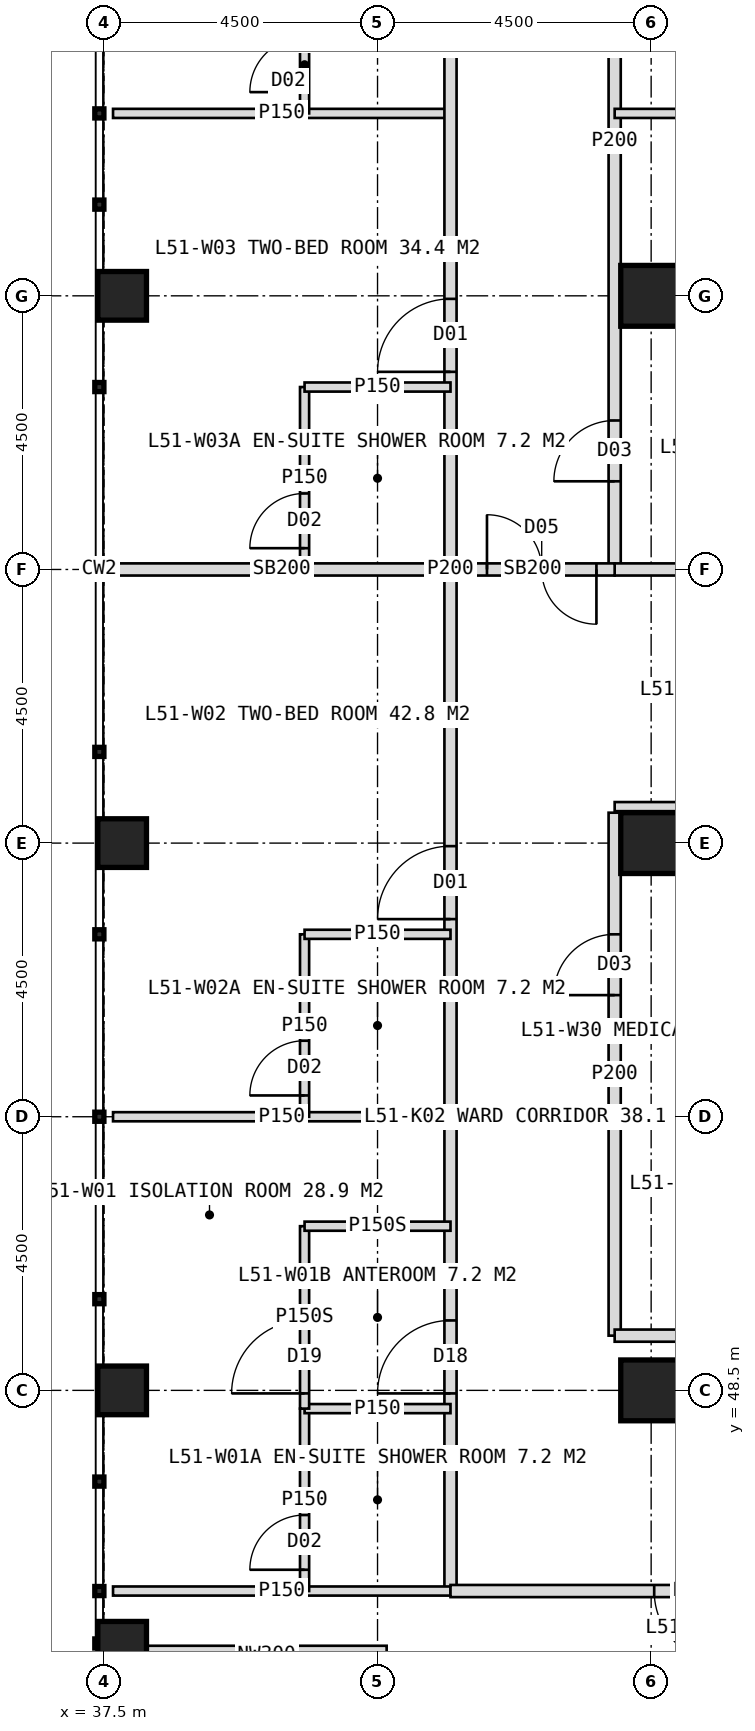
"""IFC4 building model, lengths in metres.
Left out: names, types, materials, properties, quantities, classifications, styles, units other than length and angle.
Written with IfcOpenShell. Run it as: python <this file> out.ifc"""

import sys

from ifc_helpers import new_model, si_unit, direction, frame, frame_2d, origin, origin_2d, place, context, subcontext, project, spatial, rectangle, hollow_rectangle, extrude, element, fill, save


model = new_model("IFC4")
c1 = context("Model", 3, precision=1e-05, world=origin(), true_north=direction((0.0, 1.0)))
c2 = subcontext(c1, "Body", "Model", "MODEL_VIEW")
j1 = project(units=[si_unit("LENGTHUNIT", "METRE"), si_unit("PLANEANGLEUNIT", "RADIAN")], contexts=[c1])
p1 = place(None, origin())
s1 = spatial("IfcSite", under=j1, at=p1, CompositionType="ELEMENT")
p2 = place(p1, origin())
s2 = spatial("IfcBuilding", under=s1, at=p2, CompositionType="ELEMENT")
p3 = place(p2, frame((0.0, 0.0, 213.0)))
s3 = spatial("IfcBuildingStorey", under=s2, at=p3, CompositionType="ELEMENT", Elevation=213.0)
for number, where, z_axis, x_axis in (
    (1, (46.5, 48.5, 0.0), (0.0, 0.0, 1.0), (1.0, 0.0, 0.0)),
    (2, (46.5, 57.5, 0.0), (0.0, 0.0, 1.0), (1.0, 0.0, 0.0)),
    (3, (46.5, 66.5, 0.0), (0.0, 0.0, 1.0), (1.0, 0.0, 0.0)),
):
    element("IfcColumn", number, at=place(p3, frame(where, z_axis=z_axis, x_axis=x_axis)), inside=s3, PredefinedType="COLUMN", context=c2, shape_type="SweptSolid", body=[
        extrude(hollow_rectangle(XDim=1.0, YDim=1.0, WallThickness=0.1, at=origin_2d()), origin(), (0.0, 0.0, 1.0), 4.0),
    ])
for number, where, z_axis, x_axis in (
    (4, (37.8, 44.3, 0.0), (0.0, 0.0, 1.0), (1.0, 0.0, 0.0)),
    (5, (37.8, 48.5, 0.0), (0.0, 0.0, 1.0), (1.0, 0.0, 0.0)),
    (6, (37.8, 57.5, 0.0), (0.0, 0.0, 1.0), (1.0, 0.0, 0.0)),
    (7, (37.8, 66.5, 0.0), (0.0, 0.0, 1.0), (1.0, 0.0, 0.0)),
):
    element("IfcColumn", number, at=place(p3, frame(where, z_axis=z_axis, x_axis=x_axis)), inside=s3, PredefinedType="COLUMN", context=c2, shape_type="SweptSolid", body=[
        extrude(hollow_rectangle(XDim=0.8, YDim=0.8, WallThickness=0.08, at=origin_2d()), origin(), (0.0, 0.0, 1.0), 4.0),
    ])
p4 = place(p3, frame((42.15, 44.15, 0.0), z_axis=(0.0, 0.0, 1.0), x_axis=(-1.0, 0.0, 0.0)))
e8 = element("IfcWall", 8, at=p4, inside=s3, PredefinedType="ELEMENTEDWALL", context=c2, shape_type="SweptSolid", body=[
    extrude(rectangle(XDim=3.95, YDim=0.3, at=frame_2d((1.975, 0.0))), origin(), (0.0, 0.0, 1.0), 2.85),
])
p5 = place(p3, frame((43.2, 53.0, 0.0), z_axis=(0.0, 0.0, 1.0), x_axis=(-1.0, 0.0, 0.0)))
e9 = element("IfcWall", 9, at=p5, inside=s3, PredefinedType="PARTITIONING", context=c2, shape_type="SweptSolid", body=[
    extrude(rectangle(XDim=5.55, YDim=0.15, at=frame_2d((2.775, 0.0))), origin(), (0.0, 0.0, 1.0), 3.75),
])
p6 = place(p3, frame((43.2, 62.0, 0.0), z_axis=(0.0, 0.0, 1.0), x_axis=(-1.0, 0.0, 0.0)))
e10 = element("IfcWall", 10, at=p6, inside=s3, PredefinedType="SOLIDWALL", context=c2, shape_type="SweptSolid", body=[
    extrude(rectangle(XDim=5.55, YDim=0.2, at=frame_2d((2.775, 0.0))), origin(), (0.0, 0.0, 1.0), 2.95),
])
p7 = place(p3, frame((43.2, 69.5, 0.0), z_axis=(0.0, 0.0, 1.0), x_axis=(-1.0, 0.0, 0.0)))
e11 = element("IfcWall", 11, at=p7, inside=s3, PredefinedType="PARTITIONING", context=c2, shape_type="SweptSolid", body=[
    extrude(rectangle(XDim=5.55, YDim=0.15, at=frame_2d((2.775, 0.0))), origin(), (0.0, 0.0, 1.0), 3.75),
])
p8 = place(p3, frame((43.2, 45.2, 0.0), z_axis=(0.0, 0.0, 1.0), x_axis=(0.0, 1.0, 0.0)))
e12 = element("IfcWall", 12, at=p8, inside=s3, PredefinedType="PARTITIONING", context=c2, shape_type="SweptSolid", body=[
    extrude(rectangle(XDim=33.6, YDim=0.2, at=frame_2d((16.8, 0.0))), origin(), (0.0, 0.0, 1.0), 3.75),
])
p9 = place(p8, frame((3.25, 0.0, 0.0)))
e13 = element("IfcOpeningElement", 13, at=p9, cuts=e12, PredefinedType="OPENING", context=c2, shape_type="SweptSolid", body=[
    extrude(rectangle(XDim=1.2, YDim=2.2, at=frame_2d((0.6, 1.1))), frame((0.0, 0.11, 0.0), z_axis=(0.0, -1.0, 0.0), x_axis=(1.0, 0.0, 0.0)), (0.0, 0.0, 1.0), 0.22),
])
p10 = place(p8, frame((11.05, 0.0, 0.0)))
e14 = element("IfcOpeningElement", 14, at=p10, cuts=e12, PredefinedType="OPENING", context=c2, shape_type="SweptSolid", body=[
    extrude(rectangle(XDim=1.2, YDim=2.2, at=frame_2d((0.6, 1.1))), frame((0.0, 0.11, 0.0), z_axis=(0.0, -1.0, 0.0), x_axis=(1.0, 0.0, 0.0)), (0.0, 0.0, 1.0), 0.22),
])
p11 = place(p8, frame((20.05, 0.0, 0.0)))
e15 = element("IfcOpeningElement", 15, at=p11, cuts=e12, PredefinedType="OPENING", context=c2, shape_type="SweptSolid", body=[
    extrude(rectangle(XDim=1.2, YDim=2.2, at=frame_2d((0.6, 1.1))), frame((0.0, 0.11, 0.0), z_axis=(0.0, -1.0, 0.0), x_axis=(1.0, 0.0, 0.0)), (0.0, 0.0, 1.0), 0.22),
])
p12 = place(p8, frame((26.95, 0.0, 0.0)))
e16 = element("IfcOpeningElement", 16, at=p12, cuts=e12, PredefinedType="OPENING", context=c2, shape_type="SweptSolid", body=[
    extrude(rectangle(XDim=1.2, YDim=2.2, at=frame_2d((0.6, 1.1))), frame((0.0, 0.11, 0.0), z_axis=(0.0, -1.0, 0.0), x_axis=(1.0, 0.0, 0.0)), (0.0, 0.0, 1.0), 0.22),
])
p13 = place(p3, frame((43.2, 45.2, 0.0), z_axis=(0.0, 0.0, 1.0), x_axis=(-1.0, 0.0, 0.0)))
e17 = element("IfcWall", 17, at=p13, inside=s3, PredefinedType="PARTITIONING", context=c2, shape_type="SweptSolid", body=[
    extrude(rectangle(XDim=5.55, YDim=0.15, at=frame_2d((2.775, 0.0))), origin(), (0.0, 0.0, 1.0), 3.75),
])
p14 = place(p3, frame((40.8, 45.2, 0.0), z_axis=(0.0, 0.0, 1.0), x_axis=(0.0, 1.0, 0.0)))
e18 = element("IfcWall", 18, at=p14, inside=s3, PredefinedType="PARTITIONING", context=c2, shape_type="SweptSolid", body=[
    extrude(rectangle(XDim=3.0, YDim=0.15, at=frame_2d((1.5, 0.0))), origin(), (0.0, 0.0, 1.0), 3.75),
])
p15 = place(p14, frame((0.35, 0.0, 0.0)))
e19 = element("IfcOpeningElement", 19, at=p15, cuts=e18, PredefinedType="OPENING", context=c2, shape_type="SweptSolid", body=[
    extrude(rectangle(XDim=0.9, YDim=2.1, at=frame_2d((0.45, 1.05))), frame((0.0, 0.085, 0.0), z_axis=(0.0, -1.0, 0.0), x_axis=(1.0, 0.0, 0.0)), (0.0, 0.0, 1.0), 0.17),
])
p16 = place(p3, frame((43.2, 48.2, 0.0), z_axis=(0.0, 0.0, 1.0), x_axis=(-1.0, 0.0, 0.0)))
e20 = element("IfcWall", 20, at=p16, inside=s3, PredefinedType="PARTITIONING", context=c2, shape_type="SweptSolid", body=[
    extrude(rectangle(XDim=2.4, YDim=0.15, at=frame_2d((1.2, 0.0))), origin(), (0.0, 0.0, 1.0), 3.75),
])
p17 = place(p3, frame((40.8, 48.2, 0.0), z_axis=(0.0, 0.0, 1.0), x_axis=(0.0, 1.0, 0.0)))
e21 = element("IfcWall", 21, at=p17, inside=s3, PredefinedType="PARTITIONING", context=c2, shape_type="SweptSolid", body=[
    extrude(rectangle(XDim=3.0, YDim=0.15, at=frame_2d((1.5, 0.0))), origin(), (0.0, 0.0, 1.0), 3.75),
])
p18 = place(p17, frame((0.25, 0.0, 0.0)))
e22 = element("IfcOpeningElement", 22, at=p18, cuts=e21, PredefinedType="OPENING", context=c2, shape_type="SweptSolid", body=[
    extrude(rectangle(XDim=1.2, YDim=2.2, at=frame_2d((0.6, 1.1))), frame((0.0, 0.085, 0.0), z_axis=(0.0, -1.0, 0.0), x_axis=(1.0, 0.0, 0.0)), (0.0, 0.0, 1.0), 0.17),
])
p19 = place(p3, frame((43.2, 51.2, 0.0), z_axis=(0.0, 0.0, 1.0), x_axis=(-1.0, 0.0, 0.0)))
e23 = element("IfcWall", 23, at=p19, inside=s3, PredefinedType="PARTITIONING", context=c2, shape_type="SweptSolid", body=[
    extrude(rectangle(XDim=2.4, YDim=0.15, at=frame_2d((1.2, 0.0))), origin(), (0.0, 0.0, 1.0), 3.75),
])
p20 = place(p3, frame((40.8, 53.0, 0.0), z_axis=(0.0, 0.0, 1.0), x_axis=(0.0, 1.0, 0.0)))
e24 = element("IfcWall", 24, at=p20, inside=s3, PredefinedType="PARTITIONING", context=c2, shape_type="SweptSolid", body=[
    extrude(rectangle(XDim=3.0, YDim=0.15, at=frame_2d((1.5, 0.0))), origin(), (0.0, 0.0, 1.0), 3.75),
])
p21 = place(p20, frame((0.35, 0.0, 0.0)))
e25 = element("IfcOpeningElement", 25, at=p21, cuts=e24, PredefinedType="OPENING", context=c2, shape_type="SweptSolid", body=[
    extrude(rectangle(XDim=0.9, YDim=2.1, at=frame_2d((0.45, 1.05))), frame((0.0, 0.085, 0.0), z_axis=(0.0, -1.0, 0.0), x_axis=(1.0, 0.0, 0.0)), (0.0, 0.0, 1.0), 0.17),
])
p22 = place(p3, frame((43.2, 56.0, 0.0), z_axis=(0.0, 0.0, 1.0), x_axis=(-1.0, 0.0, 0.0)))
e26 = element("IfcWall", 26, at=p22, inside=s3, PredefinedType="PARTITIONING", context=c2, shape_type="SweptSolid", body=[
    extrude(rectangle(XDim=2.4, YDim=0.15, at=frame_2d((1.2, 0.0))), origin(), (0.0, 0.0, 1.0), 3.75),
])
p23 = place(p3, frame((40.8, 62.0, 0.0), z_axis=(0.0, 0.0, 1.0), x_axis=(0.0, 1.0, 0.0)))
e27 = element("IfcWall", 27, at=p23, inside=s3, PredefinedType="PARTITIONING", context=c2, shape_type="SweptSolid", body=[
    extrude(rectangle(XDim=3.0, YDim=0.15, at=frame_2d((1.5, 0.0))), origin(), (0.0, 0.0, 1.0), 3.75),
])
p24 = place(p23, frame((0.35, 0.0, 0.0)))
e28 = element("IfcOpeningElement", 28, at=p24, cuts=e27, PredefinedType="OPENING", context=c2, shape_type="SweptSolid", body=[
    extrude(rectangle(XDim=0.9, YDim=2.1, at=frame_2d((0.45, 1.05))), frame((0.0, 0.085, 0.0), z_axis=(0.0, -1.0, 0.0), x_axis=(1.0, 0.0, 0.0)), (0.0, 0.0, 1.0), 0.17),
])
p25 = place(p3, frame((43.2, 65.0, 0.0), z_axis=(0.0, 0.0, 1.0), x_axis=(-1.0, 0.0, 0.0)))
e29 = element("IfcWall", 29, at=p25, inside=s3, PredefinedType="PARTITIONING", context=c2, shape_type="SweptSolid", body=[
    extrude(rectangle(XDim=2.4, YDim=0.15, at=frame_2d((1.2, 0.0))), origin(), (0.0, 0.0, 1.0), 3.75),
])
p26 = place(p3, frame((40.8, 69.5, 0.0), z_axis=(0.0, 0.0, 1.0), x_axis=(0.0, 1.0, 0.0)))
e30 = element("IfcWall", 30, at=p26, inside=s3, PredefinedType="PARTITIONING", context=c2, shape_type="SweptSolid", body=[
    extrude(rectangle(XDim=2.4, YDim=0.15, at=frame_2d((1.2, 0.0))), origin(), (0.0, 0.0, 1.0), 3.75),
])
p27 = place(p26, frame((0.35, 0.0, 0.0)))
e31 = element("IfcOpeningElement", 31, at=p27, cuts=e30, PredefinedType="OPENING", context=c2, shape_type="SweptSolid", body=[
    extrude(rectangle(XDim=0.9, YDim=2.1, at=frame_2d((0.45, 1.05))), frame((0.0, 0.085, 0.0), z_axis=(0.0, -1.0, 0.0), x_axis=(1.0, 0.0, 0.0)), (0.0, 0.0, 1.0), 0.17),
])
p28 = place(p3, frame((51.0, 53.0, 0.0), z_axis=(0.0, 0.0, 1.0), x_axis=(-1.0, 0.0, 0.0)))
e32 = element("IfcWall", 32, at=p28, inside=s3, PredefinedType="PARTITIONING", context=c2, shape_type="SweptSolid", body=[
    extrude(rectangle(XDim=5.1, YDim=0.15, at=frame_2d((2.55, 0.0))), origin(), (0.0, 0.0, 1.0), 3.75),
])
p29 = place(p3, frame((45.9, 49.4, 0.0), z_axis=(0.0, 0.0, 1.0), x_axis=(0.0, 1.0, 0.0)))
e33 = element("IfcWall", 33, at=p29, inside=s3, PredefinedType="PARTITIONING", context=c2, shape_type="SweptSolid", body=[
    extrude(rectangle(XDim=8.6, YDim=0.2, at=frame_2d((4.3, 0.0))), origin(), (0.0, 0.0, 1.0), 3.75),
])
p30 = place(p29, frame((5.6, 0.0, 0.0)))
e34 = element("IfcOpeningElement", 34, at=p30, cuts=e33, PredefinedType="OPENING", context=c2, shape_type="SweptSolid", body=[
    extrude(rectangle(XDim=1.0, YDim=2.1, at=frame_2d((0.5, 1.05))), frame((0.0, 0.11, 0.0), z_axis=(0.0, -1.0, 0.0), x_axis=(1.0, 0.0, 0.0)), (0.0, 0.0, 1.0), 0.22),
])
p31 = place(p3, frame((45.9, 62.0, 0.0), z_axis=(0.0, 0.0, 1.0), x_axis=(0.0, 1.0, 0.0)))
e35 = element("IfcWall", 35, at=p31, inside=s3, PredefinedType="PARTITIONING", context=c2, shape_type="SweptSolid", body=[
    extrude(rectangle(XDim=14.1, YDim=0.2, at=frame_2d((7.05, 0.0))), origin(), (0.0, 0.0, 1.0), 3.75),
])
p32 = place(p31, frame((1.45, 0.0, 0.0)))
e36 = element("IfcOpeningElement", 36, at=p32, cuts=e35, PredefinedType="OPENING", context=c2, shape_type="SweptSolid", body=[
    extrude(rectangle(XDim=1.0, YDim=2.1, at=frame_2d((0.5, 1.05))), frame((0.0, 0.11, 0.0), z_axis=(0.0, -1.0, 0.0), x_axis=(1.0, 0.0, 0.0)), (0.0, 0.0, 1.0), 0.22),
])
p33 = place(p31, frame((10.3, 0.0, 0.0)))
e37 = element("IfcOpeningElement", 37, at=p33, cuts=e35, PredefinedType="OPENING", context=c2, shape_type="SweptSolid", body=[
    extrude(rectangle(XDim=1.0, YDim=2.1, at=frame_2d((0.5, 1.05))), frame((0.0, 0.11, 0.0), z_axis=(0.0, -1.0, 0.0), x_axis=(1.0, 0.0, 0.0)), (0.0, 0.0, 1.0), 0.22),
])
p34 = place(p3, frame((51.0, 58.1, 0.0), z_axis=(0.0, 0.0, 1.0), x_axis=(-1.0, 0.0, 0.0)))
e38 = element("IfcWall", 38, at=p34, inside=s3, PredefinedType="PARTITIONING", context=c2, shape_type="SweptSolid", body=[
    extrude(rectangle(XDim=5.1, YDim=0.15, at=frame_2d((2.55, 0.0))), origin(), (0.0, 0.0, 1.0), 3.75),
])
p35 = place(p34, frame((0.6, 0.0, 0.0)))
e39 = element("IfcOpeningElement", 39, at=p35, cuts=e38, PredefinedType="OPENING", context=c2, shape_type="SweptSolid", body=[
    extrude(rectangle(XDim=0.9, YDim=2.1, at=frame_2d((0.45, 1.05))), frame((0.0, 0.085, 0.0), z_axis=(0.0, -1.0, 0.0), x_axis=(1.0, 0.0, 0.0)), (0.0, 0.0, 1.0), 0.17),
])
p36 = place(p3, frame((51.0, 62.0, 0.0), z_axis=(0.0, 0.0, 1.0), x_axis=(-1.0, 0.0, 0.0)))
e40 = element("IfcWall", 40, at=p36, inside=s3, PredefinedType="SOLIDWALL", context=c2, shape_type="SweptSolid", body=[
    extrude(rectangle(XDim=5.1, YDim=0.2, at=frame_2d((2.55, 0.0))), origin(), (0.0, 0.0, 1.0), 2.95),
])
p37 = place(p3, frame((51.0, 69.5, 0.0), z_axis=(0.0, 0.0, 1.0), x_axis=(-1.0, 0.0, 0.0)))
e41 = element("IfcWall", 41, at=p37, inside=s3, PredefinedType="PARTITIONING", context=c2, shape_type="SweptSolid", body=[
    extrude(rectangle(XDim=5.1, YDim=0.15, at=frame_2d((2.55, 0.0))), origin(), (0.0, 0.0, 1.0), 3.75),
])
p38 = place(p3, frame((76.8, 45.2, 0.0), z_axis=(0.0, 0.0, 1.0), x_axis=(-1.0, 0.0, 0.0)))
e42 = element("IfcWall", 42, at=p38, inside=s3, PredefinedType="PARTITIONING", context=c2, shape_type="SweptSolid", body=[
    extrude(rectangle(XDim=33.6, YDim=0.2, at=frame_2d((16.8, 0.0))), origin(), (0.0, 0.0, 1.0), 3.75),
])
p39 = place(p38, frame((3.25, 0.0, 0.0)))
e43 = element("IfcOpeningElement", 43, at=p39, cuts=e42, PredefinedType="OPENING", context=c2, shape_type="SweptSolid", body=[
    extrude(rectangle(XDim=1.2, YDim=2.2, at=frame_2d((0.6, 1.1))), frame((0.0, 0.11, 0.0), z_axis=(0.0, -1.0, 0.0), x_axis=(1.0, 0.0, 0.0)), (0.0, 0.0, 1.0), 0.22),
])
p40 = place(p38, frame((11.05, 0.0, 0.0)))
e44 = element("IfcOpeningElement", 44, at=p40, cuts=e42, PredefinedType="OPENING", context=c2, shape_type="SweptSolid", body=[
    extrude(rectangle(XDim=1.2, YDim=2.2, at=frame_2d((0.6, 1.1))), frame((0.0, 0.11, 0.0), z_axis=(0.0, -1.0, 0.0), x_axis=(1.0, 0.0, 0.0)), (0.0, 0.0, 1.0), 0.22),
])
p41 = place(p38, frame((20.05, 0.0, 0.0)))
e45 = element("IfcOpeningElement", 45, at=p41, cuts=e42, PredefinedType="OPENING", context=c2, shape_type="SweptSolid", body=[
    extrude(rectangle(XDim=1.2, YDim=2.2, at=frame_2d((0.6, 1.1))), frame((0.0, 0.11, 0.0), z_axis=(0.0, -1.0, 0.0), x_axis=(1.0, 0.0, 0.0)), (0.0, 0.0, 1.0), 0.22),
])
p42 = place(p38, frame((29.05, 0.0, 0.0)))
e46 = element("IfcOpeningElement", 46, at=p42, cuts=e42, PredefinedType="OPENING", context=c2, shape_type="SweptSolid", body=[
    extrude(rectangle(XDim=1.2, YDim=2.2, at=frame_2d((0.6, 1.1))), frame((0.0, 0.11, 0.0), z_axis=(0.0, -1.0, 0.0), x_axis=(1.0, 0.0, 0.0)), (0.0, 0.0, 1.0), 0.22),
])
p43 = place(p3, frame((57.75, 49.4, 0.0), z_axis=(0.0, 0.0, 1.0), x_axis=(-1.0, 0.0, 0.0)))
e47 = element("IfcWall", 47, at=p43, inside=s3, PredefinedType="PARTITIONING", context=c2, shape_type="SweptSolid", body=[
    extrude(rectangle(XDim=11.85, YDim=0.2, at=frame_2d((5.925, 0.0))), origin(), (0.0, 0.0, 1.0), 3.75),
])
p44 = place(p43, frame((3.55, 0.0, 0.0)))
e48 = element("IfcOpeningElement", 48, at=p44, cuts=e47, PredefinedType="OPENING", context=c2, shape_type="SweptSolid", body=[
    extrude(rectangle(XDim=1.0, YDim=2.1, at=frame_2d((0.5, 1.05))), frame((0.0, 0.11, 0.0), z_axis=(0.0, -1.0, 0.0), x_axis=(1.0, 0.0, 0.0)), (0.0, 0.0, 1.0), 0.22),
])
p45 = place(p43, frame((8.05, 0.0, 0.0)))
e49 = element("IfcOpeningElement", 49, at=p45, cuts=e47, PredefinedType="OPENING", context=c2, shape_type="SweptSolid", body=[
    extrude(rectangle(XDim=1.0, YDim=2.1, at=frame_2d((0.5, 1.05))), frame((0.0, 0.11, 0.0), z_axis=(0.0, -1.0, 0.0), x_axis=(1.0, 0.0, 0.0)), (0.0, 0.0, 1.0), 0.22),
])
p46 = place(p3, frame((45.9, 62.0, 0.0), z_axis=(0.0, 0.0, 1.0), x_axis=(-1.0, 0.0, 0.0)))
e50 = element("IfcWall", 50, at=p46, inside=s3, PredefinedType="SOLIDWALL", context=c2, shape_type="SweptSolid", body=[
    extrude(rectangle(XDim=2.7, YDim=0.2, at=frame_2d((1.35, 0.0))), origin(), (0.0, 0.0, 1.0), 2.95),
])
p47 = place(p46, frame((0.3, 0.0, 0.0)))
e51 = element("IfcOpeningElement", 51, at=p47, cuts=e50, PredefinedType="OPENING", context=c2, shape_type="SweptSolid", body=[
    extrude(rectangle(XDim=1.8, YDim=2.2, at=frame_2d((0.9, 1.1))), frame((0.0, 0.11, 0.0), z_axis=(0.0, -1.0, 0.0), x_axis=(1.0, 0.0, 0.0)), (0.0, 0.0, 1.0), 0.22),
])
p48 = place(p18, origin())
e52 = element("IfcDoor", 52, at=p48, inside=s3, OperationType="SINGLE_SWING_LEFT", PredefinedType="DOOR", context=c2, shape_type="SweptSolid", body=[
    extrude(rectangle(XDim=1.2, YDim=2.2, at=frame_2d((0.6, 1.1))), frame((0.0, 0.025, 0.0), z_axis=(0.0, -1.0, 0.0), x_axis=(1.0, 0.0, 0.0)), (0.0, 0.0, 1.0), 0.05),
])
fill(e22, e52)
p49 = place(p9, origin())
e53 = element("IfcDoor", 53, at=p49, inside=s3, OperationType="SINGLE_SWING_LEFT", PredefinedType="DOOR", context=c2, shape_type="SweptSolid", body=[
    extrude(rectangle(XDim=1.2, YDim=2.2, at=frame_2d((0.6, 1.1))), frame((0.0, 0.025, 0.0), z_axis=(0.0, -1.0, 0.0), x_axis=(1.0, 0.0, 0.0)), (0.0, 0.0, 1.0), 0.05),
])
fill(e13, e53)
p50 = place(p15, origin())
e54 = element("IfcDoor", 54, at=p50, inside=s3, OperationType="SINGLE_SWING_LEFT", PredefinedType="DOOR", context=c2, shape_type="SweptSolid", body=[
    extrude(rectangle(XDim=0.9, YDim=2.1, at=frame_2d((0.45, 1.05))), frame((0.0, 0.025, 0.0), z_axis=(0.0, -1.0, 0.0), x_axis=(1.0, 0.0, 0.0)), (0.0, 0.0, 1.0), 0.05),
])
fill(e19, e54)
p51 = place(p10, origin())
e55 = element("IfcDoor", 55, at=p51, inside=s3, OperationType="SINGLE_SWING_LEFT", PredefinedType="DOOR", context=c2, shape_type="SweptSolid", body=[
    extrude(rectangle(XDim=1.2, YDim=2.2, at=frame_2d((0.6, 1.1))), frame((0.0, 0.025, 0.0), z_axis=(0.0, -1.0, 0.0), x_axis=(1.0, 0.0, 0.0)), (0.0, 0.0, 1.0), 0.05),
])
fill(e14, e55)
p52 = place(p21, origin())
e56 = element("IfcDoor", 56, at=p52, inside=s3, OperationType="SINGLE_SWING_LEFT", PredefinedType="DOOR", context=c2, shape_type="SweptSolid", body=[
    extrude(rectangle(XDim=0.9, YDim=2.1, at=frame_2d((0.45, 1.05))), frame((0.0, 0.025, 0.0), z_axis=(0.0, -1.0, 0.0), x_axis=(1.0, 0.0, 0.0)), (0.0, 0.0, 1.0), 0.05),
])
fill(e25, e56)
p53 = place(p11, origin())
e57 = element("IfcDoor", 57, at=p53, inside=s3, OperationType="SINGLE_SWING_LEFT", PredefinedType="DOOR", context=c2, shape_type="SweptSolid", body=[
    extrude(rectangle(XDim=1.2, YDim=2.2, at=frame_2d((0.6, 1.1))), frame((0.0, 0.025, 0.0), z_axis=(0.0, -1.0, 0.0), x_axis=(1.0, 0.0, 0.0)), (0.0, 0.0, 1.0), 0.05),
])
fill(e15, e57)
p54 = place(p24, origin())
e58 = element("IfcDoor", 58, at=p54, inside=s3, OperationType="SINGLE_SWING_LEFT", PredefinedType="DOOR", context=c2, shape_type="SweptSolid", body=[
    extrude(rectangle(XDim=0.9, YDim=2.1, at=frame_2d((0.45, 1.05))), frame((0.0, 0.025, 0.0), z_axis=(0.0, -1.0, 0.0), x_axis=(1.0, 0.0, 0.0)), (0.0, 0.0, 1.0), 0.05),
])
fill(e28, e58)
p55 = place(p27, origin())
e59 = element("IfcDoor", 59, at=p55, inside=s3, OperationType="SINGLE_SWING_LEFT", PredefinedType="DOOR", context=c2, shape_type="SweptSolid", body=[
    extrude(rectangle(XDim=0.9, YDim=2.1, at=frame_2d((0.45, 1.05))), frame((0.0, 0.025, 0.0), z_axis=(0.0, -1.0, 0.0), x_axis=(1.0, 0.0, 0.0)), (0.0, 0.0, 1.0), 0.05),
])
fill(e31, e59)
p56 = place(p30, origin())
e60 = element("IfcDoor", 60, at=p56, inside=s3, OperationType="SINGLE_SWING_LEFT", PredefinedType="DOOR", context=c2, shape_type="SweptSolid", body=[
    extrude(rectangle(XDim=1.0, YDim=2.1, at=frame_2d((0.5, 1.05))), frame((0.0, 0.025, 0.0), z_axis=(0.0, -1.0, 0.0), x_axis=(1.0, 0.0, 0.0)), (0.0, 0.0, 1.0), 0.05),
])
fill(e34, e60)
p57 = place(p32, origin())
e61 = element("IfcDoor", 61, at=p57, inside=s3, OperationType="SINGLE_SWING_LEFT", PredefinedType="DOOR", context=c2, shape_type="SweptSolid", body=[
    extrude(rectangle(XDim=1.0, YDim=2.1, at=frame_2d((0.5, 1.05))), frame((0.0, 0.025, 0.0), z_axis=(0.0, -1.0, 0.0), x_axis=(1.0, 0.0, 0.0)), (0.0, 0.0, 1.0), 0.05),
])
fill(e36, e61)
p58 = place(p42, origin())
e62 = element("IfcDoor", 62, at=p58, inside=s3, OperationType="SINGLE_SWING_LEFT", PredefinedType="DOOR", context=c2, shape_type="SweptSolid", body=[
    extrude(rectangle(XDim=1.2, YDim=2.2, at=frame_2d((0.6, 1.1))), frame((0.0, 0.025, 0.0), z_axis=(0.0, -1.0, 0.0), x_axis=(1.0, 0.0, 0.0)), (0.0, 0.0, 1.0), 0.05),
])
fill(e46, e62)
p59 = place(p47, origin())
e63 = element("IfcDoor", 63, at=p59, inside=s3, OperationType="DOUBLE_DOOR_DOUBLE_SWING", PredefinedType="DOOR", context=c2, shape_type="SweptSolid", body=[
    extrude(rectangle(XDim=1.8, YDim=2.2, at=frame_2d((0.9, 1.1))), frame((0.0, 0.025, 0.0), z_axis=(0.0, -1.0, 0.0), x_axis=(1.0, 0.0, 0.0)), (0.0, 0.0, 1.0), 0.05),
])
fill(e51, e63)
save(model, sys.argv[1])
